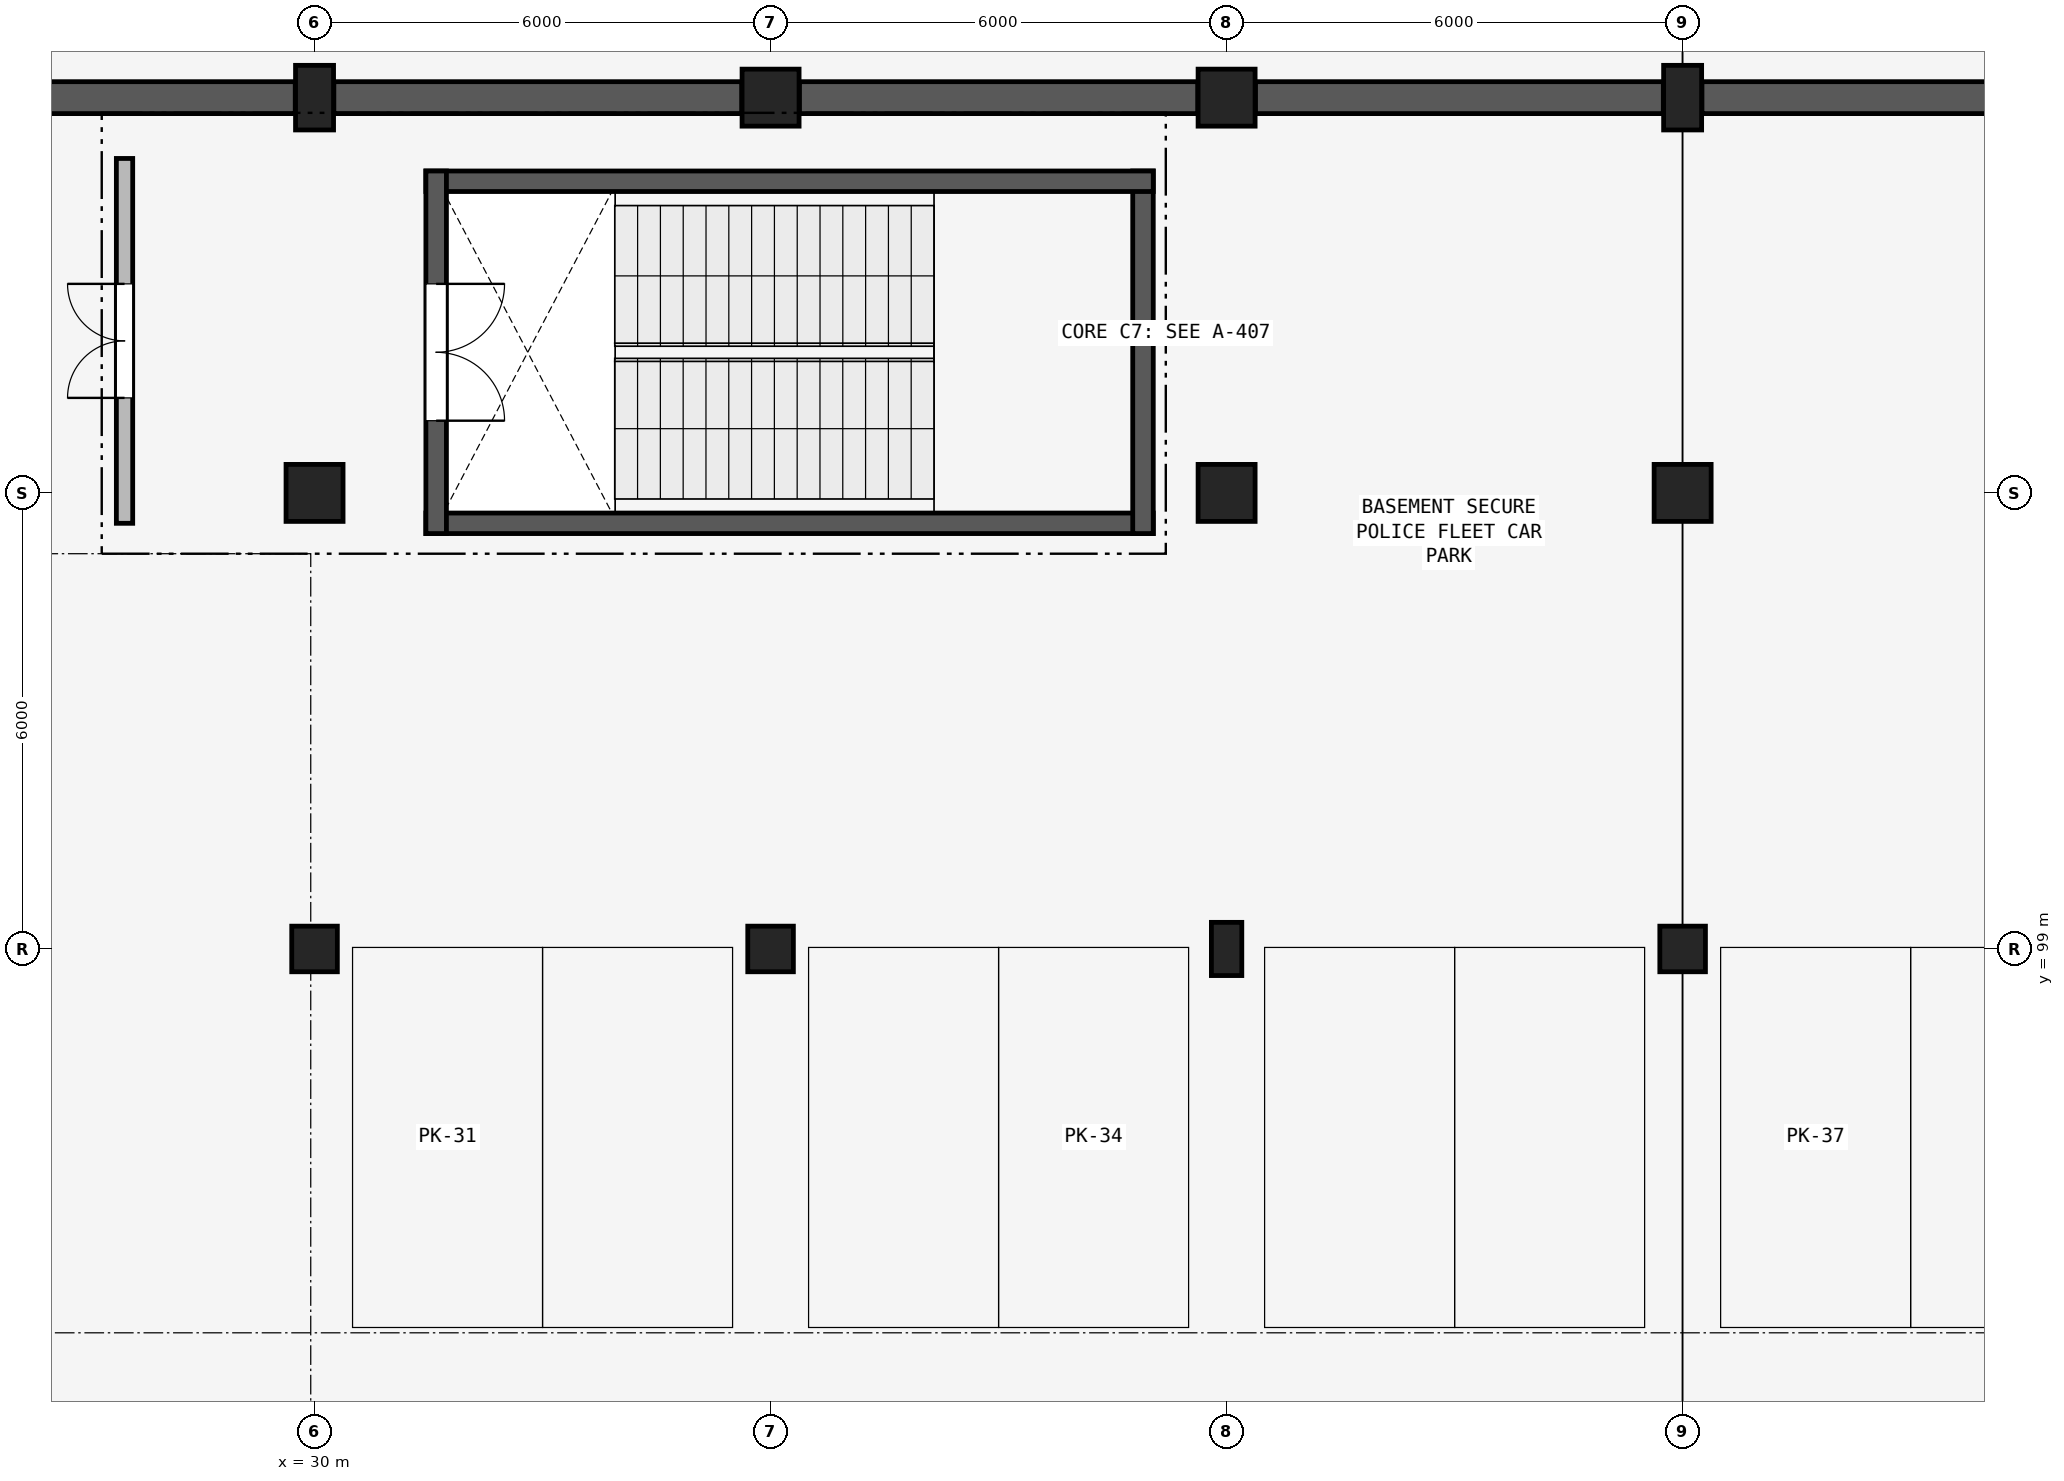
"""IFC4 building model, lengths in metres.
Left out: names, types, materials, properties, quantities, classifications, styles, units other than length and angle.
Written with IfcOpenShell. Run it as: python <this file> out.ifc"""

import sys

from ifc_helpers import new_model, si_unit, direction, frame, frame_2d, origin, origin_2d, place, context, subcontext, project, spatial, rectangle, extrude, element, fill, save


model = new_model("IFC4")
c1 = context("Model", 3, precision=1e-05, world=origin(), true_north=direction((0.0, 1.0)))
c2 = subcontext(c1, "Body", "Model", "MODEL_VIEW")
j1 = project(units=[si_unit("LENGTHUNIT", "METRE"), si_unit("PLANEANGLEUNIT", "RADIAN")], contexts=[c1])
p1 = place(None, origin())
s1 = spatial("IfcSite", under=j1, at=p1, CompositionType="ELEMENT")
p2 = place(p1, origin())
s2 = spatial("IfcBuilding", under=s1, at=p2, CompositionType="ELEMENT")
p3 = place(p2, frame((0.0, 0.0, -4.5)))
s3 = spatial("IfcBuildingStorey", under=s2, at=p3, CompositionType="ELEMENT", Elevation=-4.5)
p4 = place(p3, frame((30.0, 99.0, 0.0), z_axis=(0.0, 0.0, 1.0), x_axis=(1.0, 0.0, 0.0)))
e1 = element("IfcColumn", 1, at=p4, inside=s3, PredefinedType="COLUMN", context=c2, shape_type="SweptSolid", body=[
    extrude(rectangle(XDim=0.6, YDim=0.6, at=origin_2d()), origin(), (0.0, 0.0, 1.0), 4.5),
])
p5 = place(p3, frame((30.0, 105.0, 0.0), z_axis=(0.0, 0.0, 1.0), x_axis=(1.0, 0.0, 0.0)))
e2 = element("IfcColumn", 2, at=p5, inside=s3, PredefinedType="COLUMN", context=c2, shape_type="SweptSolid", body=[
    extrude(rectangle(XDim=0.75, YDim=0.75, at=origin_2d()), origin(), (0.0, 0.0, 1.0), 4.5),
])
p6 = place(p3, frame((30.0, 110.2, 0.0), z_axis=(0.0, 0.0, 1.0), x_axis=(1.0, 0.0, 0.0)))
e3 = element("IfcColumn", 3, at=p6, inside=s3, PredefinedType="COLUMN", context=c2, shape_type="SweptSolid", body=[
    extrude(rectangle(XDim=0.5, YDim=0.85, at=origin_2d()), origin(), (0.0, 0.0, 1.0), 4.5),
])
p7 = place(p3, frame((36.0, 99.0, 0.0), z_axis=(0.0, 0.0, 1.0), x_axis=(1.0, 0.0, 0.0)))
e4 = element("IfcColumn", 4, at=p7, inside=s3, PredefinedType="COLUMN", context=c2, shape_type="SweptSolid", body=[
    extrude(rectangle(XDim=0.6, YDim=0.6, at=origin_2d()), origin(), (0.0, 0.0, 1.0), 4.5),
])
p8 = place(p3, frame((36.0, 110.2, 0.0), z_axis=(0.0, 0.0, 1.0), x_axis=(1.0, 0.0, 0.0)))
e5 = element("IfcColumn", 5, at=p8, inside=s3, PredefinedType="COLUMN", context=c2, shape_type="SweptSolid", body=[
    extrude(rectangle(XDim=0.75, YDim=0.75, at=origin_2d()), origin(), (0.0, 0.0, 1.0), 4.5),
])
p9 = place(p3, frame((42.0, 99.0, 0.0), z_axis=(0.0, 0.0, 1.0), x_axis=(1.0, 0.0, 0.0)))
e6 = element("IfcColumn", 6, at=p9, inside=s3, PredefinedType="COLUMN", context=c2, shape_type="SweptSolid", body=[
    extrude(rectangle(XDim=0.4, YDim=0.7, at=origin_2d()), origin(), (0.0, 0.0, 1.0), 4.5),
])
for number, where, z_axis, x_axis in (
    (7, (42.0, 105.0, 0.0), (0.0, 0.0, 1.0), (1.0, 0.0, 0.0)),
    (8, (42.0, 110.2, 0.0), (0.0, 0.0, 1.0), (1.0, 0.0, 0.0)),
):
    element("IfcColumn", number, at=place(p3, frame(where, z_axis=z_axis, x_axis=x_axis)), inside=s3, PredefinedType="COLUMN", context=c2, shape_type="SweptSolid", body=[
        extrude(rectangle(XDim=0.75, YDim=0.75, at=origin_2d()), origin(), (0.0, 0.0, 1.0), 4.5),
    ])
p10 = place(p3, frame((48.0, 99.0, 0.0), z_axis=(0.0, 0.0, 1.0), x_axis=(1.0, 0.0, 0.0)))
e9 = element("IfcColumn", 9, at=p10, inside=s3, PredefinedType="COLUMN", context=c2, shape_type="SweptSolid", body=[
    extrude(rectangle(XDim=0.6, YDim=0.6, at=origin_2d()), origin(), (0.0, 0.0, 1.0), 4.5),
])
p11 = place(p3, frame((48.0, 105.0, 0.0), z_axis=(0.0, 0.0, 1.0), x_axis=(1.0, 0.0, 0.0)))
e10 = element("IfcColumn", 10, at=p11, inside=s3, PredefinedType="COLUMN", context=c2, shape_type="SweptSolid", body=[
    extrude(rectangle(XDim=0.75, YDim=0.75, at=origin_2d()), origin(), (0.0, 0.0, 1.0), 4.5),
])
p12 = place(p3, frame((48.0, 110.2, 0.0), z_axis=(0.0, 0.0, 1.0), x_axis=(1.0, 0.0, 0.0)))
e11 = element("IfcColumn", 11, at=p12, inside=s3, PredefinedType="COLUMN", context=c2, shape_type="SweptSolid", body=[
    extrude(rectangle(XDim=0.5, YDim=0.85, at=origin_2d()), origin(), (0.0, 0.0, 1.0), 4.5),
])
p13 = place(p3, frame((24.0, 110.2, 0.0), z_axis=(0.0, 0.0, 1.0), x_axis=(1.0, 0.0, 0.0)))
e12 = element("IfcWall", 12, at=p13, inside=s3, PredefinedType="SHEAR", context=c2, shape_type="SweptSolid", body=[
    extrude(rectangle(XDim=5.746, YDim=0.42, at=frame_2d((2.873, 0.0))), origin(), (0.0, 0.0, 1.0), 4.195),
])
p14 = place(p3, frame((30.254, 110.2, 0.0), z_axis=(0.0, 0.0, 1.0), x_axis=(1.0, 0.0, 0.0)))
e13 = element("IfcWall", 13, at=p14, inside=s3, PredefinedType="SHEAR", context=c2, shape_type="SweptSolid", body=[
    extrude(rectangle(XDim=5.367, YDim=0.42, at=frame_2d((2.684, 0.0))), origin(), (0.0, 0.0, 1.0), 4.195),
])
p15 = place(p3, frame((36.379, 110.2, 0.0), z_axis=(0.0, 0.0, 1.0), x_axis=(1.0, 0.0, 0.0)))
e14 = element("IfcWall", 14, at=p15, inside=s3, PredefinedType="SHEAR", context=c2, shape_type="SweptSolid", body=[
    extrude(rectangle(XDim=5.242, YDim=0.42, at=frame_2d((2.621, 0.0))), origin(), (0.0, 0.0, 1.0), 4.195),
])
for number, where, z_axis, x_axis in (
    (15, (42.379, 110.2, 0.0), (0.0, 0.0, 1.0), (1.0, 0.0, 0.0)),
    (16, (48.254, 110.2, 0.0), (0.0, 0.0, 1.0), (1.0, 0.0, 0.0)),
):
    element("IfcWall", number, at=place(p3, frame(where, z_axis=z_axis, x_axis=x_axis)), inside=s3, PredefinedType="SHEAR", context=c2, shape_type="SweptSolid", body=[
        extrude(rectangle(XDim=5.367, YDim=0.42, at=frame_2d((2.684, 0.0))), origin(), (0.0, 0.0, 1.0), 4.195),
    ])
p16 = place(p3, frame((31.465, 104.6, 0.0), z_axis=(0.0, 0.0, 1.0), x_axis=(1.0, 0.0, 0.0)))
e17 = element("IfcWall", 17, at=p16, inside=s3, PredefinedType="SHEAR", context=c2, shape_type="SweptSolid", body=[
    extrude(rectangle(XDim=9.57, YDim=0.27, at=frame_2d((4.785, 0.0))), origin(), (0.0, 0.0, 1.0), 4.36),
])
p17 = place(p3, frame((40.9, 104.465, 0.0), z_axis=(0.0, 0.0, 1.0), x_axis=(0.0, 1.0, 0.0)))
e18 = element("IfcWall", 18, at=p17, inside=s3, PredefinedType="SHEAR", context=c2, shape_type="SweptSolid", body=[
    extrude(rectangle(XDim=4.77, YDim=0.27, at=frame_2d((2.385, 0.0))), origin(), (0.0, 0.0, 1.0), 4.36),
])
p18 = place(p3, frame((41.035, 109.1, 0.0), z_axis=(0.0, 0.0, 1.0), x_axis=(-1.0, 0.0, 0.0)))
e19 = element("IfcWall", 19, at=p18, inside=s3, PredefinedType="SHEAR", context=c2, shape_type="SweptSolid", body=[
    extrude(rectangle(XDim=9.57, YDim=0.27, at=frame_2d((4.785, 0.0))), origin(), (0.0, 0.0, 1.0), 4.36),
])
p19 = place(p3, frame((31.6, 109.235, 0.0), z_axis=(0.0, 0.0, 1.0), x_axis=(0.0, -1.0, 0.0)))
e20 = element("IfcWall", 20, at=p19, inside=s3, PredefinedType="SHEAR", context=c2, shape_type="SweptSolid", body=[
    extrude(rectangle(XDim=4.77, YDim=0.27, at=frame_2d((2.385, 0.0))), origin(), (0.0, 0.0, 1.0), 4.36),
])
p20 = place(p19, frame((1.485, 0.0, 0.0)))
e21 = element("IfcOpeningElement", 21, at=p20, cuts=e20, PredefinedType="OPENING", context=c2, shape_type="SweptSolid", body=[
    extrude(rectangle(XDim=1.8, YDim=2.2, at=frame_2d((0.9, 1.1))), frame((0.0, 0.145, 0.0), z_axis=(0.0, -1.0, 0.0), x_axis=(1.0, 0.0, 0.0)), (0.0, 0.0, 1.0), 0.29),
])
p21 = place(p3, frame((27.5, 104.6, 0.0), z_axis=(0.0, 0.0, 1.0), x_axis=(0.0, 1.0, 0.0)))
e22 = element("IfcWall", 22, at=p21, inside=s3, PredefinedType="PARTITIONING", context=c2, shape_type="SweptSolid", body=[
    extrude(rectangle(XDim=4.8, YDim=0.215, at=frame_2d((2.4, 0.0))), origin(), (0.0, 0.0, 1.0), 2.99),
])
p22 = place(p21, frame((1.65, 0.0, 0.0)))
e23 = element("IfcOpeningElement", 23, at=p22, cuts=e22, PredefinedType="OPENING", context=c2, shape_type="SweptSolid", body=[
    extrude(rectangle(XDim=1.5, YDim=2.15, at=frame_2d((0.75, 1.075))), frame((0.0, 0.117, 0.0), z_axis=(0.0, -1.0, 0.0), x_axis=(1.0, 0.0, 0.0)), (0.0, 0.0, 1.0), 0.235),
])
p23 = place(p20, origin())
e24 = element("IfcDoor", 24, at=p23, inside=s3, OperationType="DOUBLE_DOOR_SINGLE_SWING", PredefinedType="DOOR", context=c2, shape_type="SweptSolid", body=[
    extrude(rectangle(XDim=1.8, YDim=2.2, at=frame_2d((0.9, 1.1))), frame((0.0, 0.025, 0.0), z_axis=(0.0, -1.0, 0.0), x_axis=(1.0, 0.0, 0.0)), (0.0, 0.0, 1.0), 0.05),
])
fill(e21, e24)
p24 = place(p22, origin())
e25 = element("IfcDoor", 25, at=p24, inside=s3, OperationType="DOUBLE_DOOR_SINGLE_SWING", PredefinedType="DOOR", context=c2, shape_type="SweptSolid", body=[
    extrude(rectangle(XDim=1.5, YDim=2.15, at=frame_2d((0.75, 1.075))), frame((0.0, 0.025, 0.0), z_axis=(0.0, -1.0, 0.0), x_axis=(1.0, 0.0, 0.0)), (0.0, 0.0, 1.0), 0.05),
])
fill(e23, e25)
save(model, sys.argv[1])
